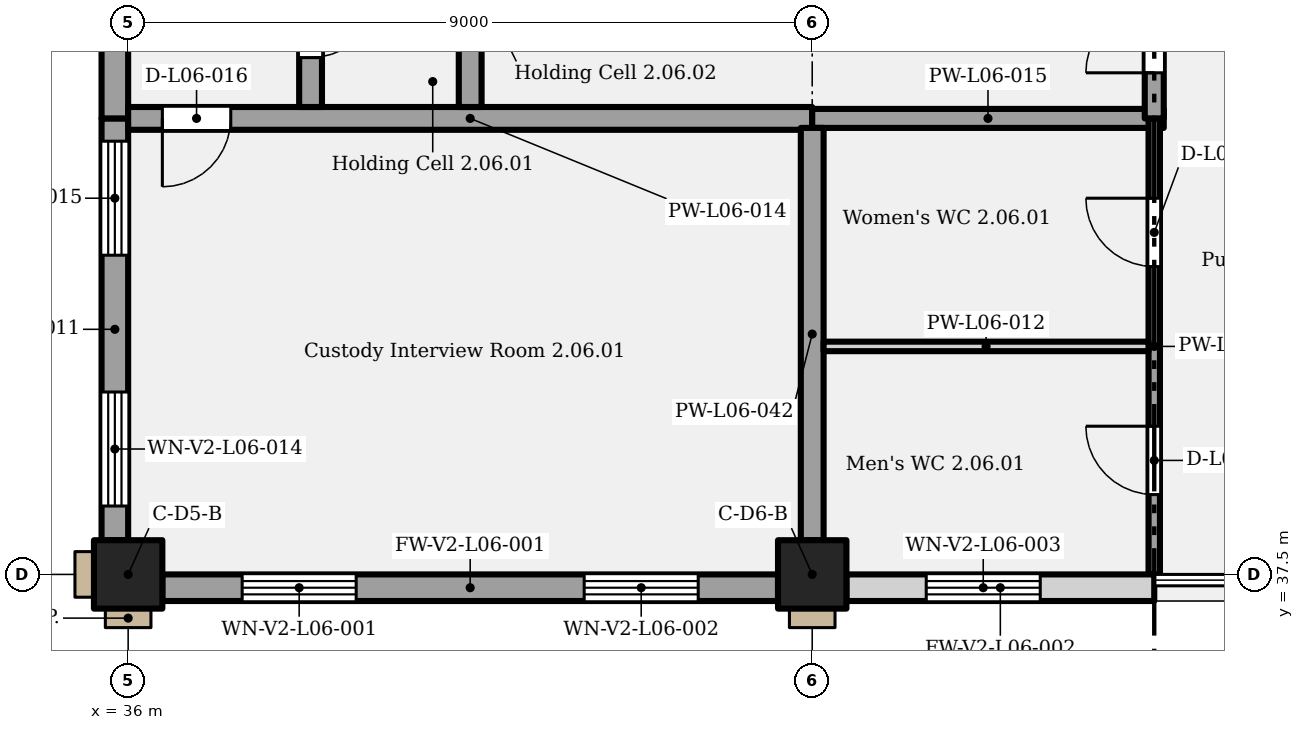
"""IFC4 building model, lengths in metres.
Left out: names, types, materials, properties, quantities, classifications, styles, units other than length and angle.
Written with IfcOpenShell. Run it as: python <this file> out.ifc"""

import sys

from ifc_helpers import new_model, si_unit, direction, frame, frame_2d, origin, origin_2d, place, context, subcontext, project, spatial, rectangle, extrude, element, fill, save


model = new_model("IFC4")
c1 = context("Model", 3, precision=1e-05, world=origin(), true_north=direction((0.0, 1.0)))
c2 = subcontext(c1, "Body", "Model", "MODEL_VIEW")
j1 = project(units=[si_unit("LENGTHUNIT", "METRE"), si_unit("PLANEANGLEUNIT", "RADIAN")], contexts=[c1])
p1 = place(None, origin())
s1 = spatial("IfcSite", under=j1, at=p1, CompositionType="ELEMENT")
p2 = place(p1, origin())
s2 = spatial("IfcBuilding", under=s1, at=p2, CompositionType="ELEMENT")
p3 = place(p2, frame((0.0, 0.0, 33.6)))
s3 = spatial("IfcBuildingStorey", under=s2, at=p3, CompositionType="ELEMENT", Elevation=33.6)
for number, where, z_axis, x_axis in (
    (1, (36.0, 37.5, 0.0), (0.0, 0.0, 1.0), (1.0, 0.0, 0.0)),
    (2, (45.0, 37.5, 0.0), (0.0, 0.0, 1.0), (1.0, 0.0, 0.0)),
):
    element("IfcColumn", number, at=place(p3, frame(where, z_axis=z_axis, x_axis=x_axis)), inside=s3, PredefinedType="COLUMN", context=c2, shape_type="SweptSolid", body=[
        extrude(rectangle(XDim=0.9, YDim=0.9, at=origin_2d()), origin(), (0.0, 0.0, 1.0), 5.4),
    ])
p4 = place(p3, frame((36.45, 37.325, 0.0), z_axis=(0.0, 0.0, 1.0), x_axis=(1.0, 0.0, 0.0)))
e3 = element("IfcWall", 3, at=p4, inside=s3, PredefinedType="SOLIDWALL", context=c2, shape_type="SweptSolid", body=[
    extrude(rectangle(XDim=8.1, YDim=0.35, at=frame_2d((4.05, 0.0))), origin(), (0.0, 0.0, 1.0), 5.15),
])
p5 = place(p4, frame((1.05, 0.0, 1.05)))
e4 = element("IfcOpeningElement", 4, at=p5, cuts=e3, PredefinedType="OPENING", context=c2, shape_type="SweptSolid", body=[
    extrude(rectangle(XDim=1.5, YDim=3.5, at=frame_2d((0.75, 1.75))), frame((0.0, 0.185, 0.0), z_axis=(0.0, -1.0, 0.0), x_axis=(1.0, 0.0, 0.0)), (0.0, 0.0, 1.0), 0.37),
])
p6 = place(p4, frame((5.55, 0.0, 1.05)))
e5 = element("IfcOpeningElement", 5, at=p6, cuts=e3, PredefinedType="OPENING", context=c2, shape_type="SweptSolid", body=[
    extrude(rectangle(XDim=1.5, YDim=3.5, at=frame_2d((0.75, 1.75))), frame((0.0, 0.185, 0.0), z_axis=(0.0, -1.0, 0.0), x_axis=(1.0, 0.0, 0.0)), (0.0, 0.0, 1.0), 0.37),
])
p7 = place(p3, frame((45.45, 37.325, 0.0), z_axis=(0.0, 0.0, 1.0), x_axis=(1.0, 0.0, 0.0)))
e6 = element("IfcWall", 6, at=p7, inside=s3, PredefinedType="SOLIDWALL", context=c2, shape_type="SweptSolid", body=[
    extrude(rectangle(XDim=4.05, YDim=0.35, at=frame_2d((2.025, 0.0))), origin(), (0.0, 0.0, 1.0), 5.15),
])
p8 = place(p7, frame((1.05, 0.0, 1.05)))
e7 = element("IfcOpeningElement", 7, at=p8, cuts=e6, PredefinedType="OPENING", context=c2, shape_type="SweptSolid", body=[
    extrude(rectangle(XDim=1.5, YDim=3.5, at=frame_2d((0.75, 1.75))), frame((0.0, 0.185, 0.0), z_axis=(0.0, -1.0, 0.0), x_axis=(1.0, 0.0, 0.0)), (0.0, 0.0, 1.0), 0.37),
])
p9 = place(p3, frame((35.825, 37.95, 0.0), z_axis=(0.0, 0.0, 1.0), x_axis=(0.0, 1.0, 0.0)))
e8 = element("IfcWall", 8, at=p9, inside=s3, PredefinedType="SOLIDWALL", context=c2, shape_type="SweptSolid", body=[
    extrude(rectangle(XDim=5.55, YDim=0.35, at=frame_2d((2.775, 0.0))), origin(), (0.0, 0.0, 1.0), 5.15),
])
p10 = place(p9, frame((0.45, 0.0, 1.05)))
e9 = element("IfcOpeningElement", 9, at=p10, cuts=e8, PredefinedType="OPENING", context=c2, shape_type="SweptSolid", body=[
    extrude(rectangle(XDim=1.5, YDim=3.5, at=frame_2d((0.75, 1.75))), frame((0.0, 0.185, 0.0), z_axis=(0.0, -1.0, 0.0), x_axis=(1.0, 0.0, 0.0)), (0.0, 0.0, 1.0), 0.37),
])
p11 = place(p9, frame((3.75, 0.0, 1.05)))
e10 = element("IfcOpeningElement", 10, at=p11, cuts=e8, PredefinedType="OPENING", context=c2, shape_type="SweptSolid", body=[
    extrude(rectangle(XDim=1.5, YDim=3.5, at=frame_2d((0.75, 1.75))), frame((0.0, 0.185, 0.0), z_axis=(0.0, -1.0, 0.0), x_axis=(1.0, 0.0, 0.0)), (0.0, 0.0, 1.0), 0.37),
])
p12 = place(p3, frame((35.825, 43.5, 0.0), z_axis=(0.0, 0.0, 1.0), x_axis=(0.0, 1.0, 0.0)))
e11 = element("IfcWall", 11, at=p12, inside=s3, PredefinedType="SOLIDWALL", context=c2, shape_type="SweptSolid", body=[
    extrude(rectangle(XDim=10.05, YDim=0.35, at=frame_2d((5.025, 0.0))), origin(), (0.0, 0.0, 1.0), 5.15),
])
p13 = place(p12, frame((1.5, 0.0, 1.05)))
e12 = element("IfcOpeningElement", 12, at=p13, cuts=e11, PredefinedType="OPENING", context=c2, shape_type="SweptSolid", body=[
    extrude(rectangle(XDim=1.5, YDim=3.5, at=frame_2d((0.75, 1.75))), frame((0.0, 0.185, 0.0), z_axis=(0.0, -1.0, 0.0), x_axis=(1.0, 0.0, 0.0)), (0.0, 0.0, 1.0), 0.37),
])
p14 = place(p12, frame((4.8, 0.0, 1.05)))
e13 = element("IfcOpeningElement", 13, at=p14, cuts=e11, PredefinedType="OPENING", context=c2, shape_type="SweptSolid", body=[
    extrude(rectangle(XDim=1.5, YDim=3.5, at=frame_2d((0.75, 1.75))), frame((0.0, 0.185, 0.0), z_axis=(0.0, -1.0, 0.0), x_axis=(1.0, 0.0, 0.0)), (0.0, 0.0, 1.0), 0.37),
])
p15 = place(p12, frame((8.1, 0.0, 1.05)))
e14 = element("IfcOpeningElement", 14, at=p15, cuts=e11, PredefinedType="OPENING", context=c2, shape_type="SweptSolid", body=[
    extrude(rectangle(XDim=1.5, YDim=3.5, at=frame_2d((0.75, 1.75))), frame((0.0, 0.185, 0.0), z_axis=(0.0, -1.0, 0.0), x_axis=(1.0, 0.0, 0.0)), (0.0, 0.0, 1.0), 0.37),
])
p16 = place(p3, frame((45.15, 40.5, 0.0), z_axis=(0.0, 0.0, 1.0), x_axis=(1.0, 0.0, 0.0)))
e15 = element("IfcWall", 15, at=p16, inside=s3, PredefinedType="PARTITIONING", context=c2, shape_type="SweptSolid", body=[
    extrude(rectangle(XDim=4.275, YDim=0.125, at=frame_2d((2.138, 0.0))), origin(), (0.0, 0.0, 1.0), 5.15),
])
p17 = place(p3, frame((36.0, 43.5, 0.0), z_axis=(0.0, 0.0, 1.0), x_axis=(1.0, 0.0, 0.0)))
e16 = element("IfcWall", 16, at=p17, inside=s3, PredefinedType="PARTITIONING", context=c2, shape_type="SweptSolid", body=[
    extrude(rectangle(XDim=9.0, YDim=0.3, at=frame_2d((4.5, 0.0))), origin(), (0.0, 0.0, 1.0), 5.15),
])
p18 = place(p17, frame((1.35, 0.0, 0.0), z_axis=(0.0, 0.0, 1.0), x_axis=(-1.0, 0.0, 0.0)))
e17 = element("IfcOpeningElement", 17, at=p18, cuts=e16, PredefinedType="OPENING", context=c2, shape_type="SweptSolid", body=[
    extrude(rectangle(XDim=0.9, YDim=2.1, at=frame_2d((0.45, 1.05))), frame((0.0, 0.16, 0.0), z_axis=(0.0, -1.0, 0.0), x_axis=(1.0, 0.0, 0.0)), (0.0, 0.0, 1.0), 0.32),
])
p19 = place(p3, frame((45.0, 43.5, 0.0), z_axis=(0.0, 0.0, 1.0), x_axis=(1.0, 0.0, 0.0)))
e18 = element("IfcWall", 18, at=p19, inside=s3, PredefinedType="PARTITIONING", context=c2, shape_type="SweptSolid", body=[
    extrude(rectangle(XDim=4.625, YDim=0.25, at=frame_2d((2.312, 0.0))), origin(), (0.0, 0.0, 1.0), 5.15),
])
p20 = place(p3, frame((38.4, 43.65, 0.0), z_axis=(0.0, 0.0, 1.0), x_axis=(0.0, 1.0, 0.0)))
e19 = element("IfcWall", 19, at=p20, inside=s3, PredefinedType="PARTITIONING", context=c2, shape_type="SweptSolid", body=[
    extrude(rectangle(XDim=10.35, YDim=0.3, at=frame_2d((5.175, 0.0))), origin(), (0.0, 0.0, 1.0), 5.15),
])
p21 = place(p20, frame((1.55, 0.0, 0.0), z_axis=(0.0, 0.0, 1.0), x_axis=(-1.0, 0.0, 0.0)))
e20 = element("IfcOpeningElement", 20, at=p21, cuts=e19, PredefinedType="OPENING", context=c2, shape_type="SweptSolid", body=[
    extrude(rectangle(XDim=0.9, YDim=2.0, at=frame_2d((0.45, 1.0))), frame((0.0, 0.16, 0.0), z_axis=(0.0, -1.0, 0.0), x_axis=(1.0, 0.0, 0.0)), (0.0, 0.0, 1.0), 0.32),
])
p22 = place(p20, frame((4.05, 0.0, 0.0), z_axis=(0.0, 0.0, 1.0), x_axis=(-1.0, 0.0, 0.0)))
e21 = element("IfcOpeningElement", 21, at=p22, cuts=e19, PredefinedType="OPENING", context=c2, shape_type="SweptSolid", body=[
    extrude(rectangle(XDim=0.9, YDim=2.0, at=frame_2d((0.45, 1.0))), frame((0.0, 0.16, 0.0), z_axis=(0.0, -1.0, 0.0), x_axis=(1.0, 0.0, 0.0)), (0.0, 0.0, 1.0), 0.32),
])
p23 = place(p20, frame((6.55, 0.0, 0.0), z_axis=(0.0, 0.0, 1.0), x_axis=(-1.0, 0.0, 0.0)))
e22 = element("IfcOpeningElement", 22, at=p23, cuts=e19, PredefinedType="OPENING", context=c2, shape_type="SweptSolid", body=[
    extrude(rectangle(XDim=0.9, YDim=2.0, at=frame_2d((0.45, 1.0))), frame((0.0, 0.16, 0.0), z_axis=(0.0, -1.0, 0.0), x_axis=(1.0, 0.0, 0.0)), (0.0, 0.0, 1.0), 0.32),
])
p24 = place(p20, frame((9.3, 0.0, 0.0), z_axis=(0.0, 0.0, 1.0), x_axis=(-1.0, 0.0, 0.0)))
e23 = element("IfcOpeningElement", 23, at=p24, cuts=e19, PredefinedType="OPENING", context=c2, shape_type="SweptSolid", body=[
    extrude(rectangle(XDim=0.9, YDim=2.0, at=frame_2d((0.45, 1.0))), frame((0.0, 0.16, 0.0), z_axis=(0.0, -1.0, 0.0), x_axis=(1.0, 0.0, 0.0)), (0.0, 0.0, 1.0), 0.32),
])
p25 = place(p3, frame((40.5, 43.65, 0.0), z_axis=(0.0, 0.0, 1.0), x_axis=(0.0, 1.0, 0.0)))
e24 = element("IfcWall", 24, at=p25, inside=s3, PredefinedType="PARTITIONING", context=c2, shape_type="SweptSolid", body=[
    extrude(rectangle(XDim=10.35, YDim=0.3, at=frame_2d((5.175, 0.0))), origin(), (0.0, 0.0, 1.0), 5.15),
])
p26 = place(p25, frame((9.35, 0.0, 0.0), z_axis=(0.0, 0.0, 1.0), x_axis=(-1.0, 0.0, 0.0)))
e25 = element("IfcOpeningElement", 25, at=p26, cuts=e24, PredefinedType="OPENING", context=c2, shape_type="SweptSolid", body=[
    extrude(rectangle(XDim=1.0, YDim=2.0, at=frame_2d((0.5, 1.0))), frame((0.0, 0.16, 0.0), z_axis=(0.0, -1.0, 0.0), x_axis=(1.0, 0.0, 0.0)), (0.0, 0.0, 1.0), 0.32),
])
p27 = place(p3, frame((45.0, 37.95, 0.0), z_axis=(0.0, 0.0, 1.0), x_axis=(0.0, 1.0, 0.0)))
e26 = element("IfcWall", 26, at=p27, inside=s3, PredefinedType="PARTITIONING", context=c2, shape_type="SweptSolid", body=[
    extrude(rectangle(XDim=5.425, YDim=0.3, at=frame_2d((2.712, 0.0))), origin(), (0.0, 0.0, 1.0), 4.2),
])
p28 = place(p3, frame((49.5, 37.5, 0.0), z_axis=(0.0, 0.0, 1.0), x_axis=(0.0, 1.0, 0.0)))
e27 = element("IfcWall", 27, at=p28, inside=s3, PredefinedType="PARTITIONING", context=c2, shape_type="SweptSolid", body=[
    extrude(rectangle(XDim=6.0, YDim=0.15, at=frame_2d((3.0, 0.0))), origin(), (0.0, 0.0, 1.0), 5.15),
])
p29 = place(p28, frame((1.05, 0.0, 0.0)))
e28 = element("IfcOpeningElement", 28, at=p29, cuts=e27, PredefinedType="OPENING", context=c2, shape_type="SweptSolid", body=[
    extrude(rectangle(XDim=0.9, YDim=2.1, at=frame_2d((0.45, 1.05))), frame((0.0, 0.085, 0.0), z_axis=(0.0, -1.0, 0.0), x_axis=(1.0, 0.0, 0.0)), (0.0, 0.0, 1.0), 0.17),
])
p30 = place(p28, frame((4.05, 0.0, 0.0)))
e29 = element("IfcOpeningElement", 29, at=p30, cuts=e27, PredefinedType="OPENING", context=c2, shape_type="SweptSolid", body=[
    extrude(rectangle(XDim=0.9, YDim=2.1, at=frame_2d((0.45, 1.05))), frame((0.0, 0.085, 0.0), z_axis=(0.0, -1.0, 0.0), x_axis=(1.0, 0.0, 0.0)), (0.0, 0.0, 1.0), 0.17),
])
p31 = place(p3, frame((49.5, 43.5, 0.0), z_axis=(0.0, 0.0, 1.0), x_axis=(0.0, 1.0, 0.0)))
e30 = element("IfcWall", 30, at=p31, inside=s3, PredefinedType="PARTITIONING", context=c2, shape_type="SweptSolid", body=[
    extrude(rectangle(XDim=10.5, YDim=0.25, at=frame_2d((5.25, 0.0))), origin(), (0.0, 0.0, 1.0), 5.15),
])
p32 = place(p31, frame((0.6, 0.0, 0.0)))
e31 = element("IfcOpeningElement", 31, at=p32, cuts=e30, PredefinedType="OPENING", context=c2, shape_type="SweptSolid", body=[
    extrude(rectangle(XDim=1.8, YDim=2.4, at=frame_2d((0.9, 1.2))), frame((0.0, 0.135, 0.0), z_axis=(0.0, -1.0, 0.0), x_axis=(1.0, 0.0, 0.0)), (0.0, 0.0, 1.0), 0.27),
])
p33 = place(p31, frame((7.1, 0.0, 0.0)))
e32 = element("IfcOpeningElement", 32, at=p33, cuts=e30, PredefinedType="OPENING", context=c2, shape_type="SweptSolid", body=[
    extrude(rectangle(XDim=1.8, YDim=2.4, at=frame_2d((0.9, 1.2))), frame((0.0, 0.135, 0.0), z_axis=(0.0, -1.0, 0.0), x_axis=(1.0, 0.0, 0.0)), (0.0, 0.0, 1.0), 0.27),
])
p34 = place(p5, origin())
e33 = element("IfcWindow", 33, at=p34, inside=s3, PartitioningType="SINGLE_PANEL", PredefinedType="WINDOW", context=c2, shape_type="SweptSolid", body=[
    extrude(rectangle(XDim=1.5, YDim=3.5, at=frame_2d((0.75, 1.75))), frame((0.0, 0.03, 0.0), z_axis=(0.0, -1.0, 0.0), x_axis=(1.0, 0.0, 0.0)), (0.0, 0.0, 1.0), 0.06),
])
fill(e4, e33)
p35 = place(p6, origin())
e34 = element("IfcWindow", 34, at=p35, inside=s3, PartitioningType="SINGLE_PANEL", PredefinedType="WINDOW", context=c2, shape_type="SweptSolid", body=[
    extrude(rectangle(XDim=1.5, YDim=3.5, at=frame_2d((0.75, 1.75))), frame((0.0, 0.03, 0.0), z_axis=(0.0, -1.0, 0.0), x_axis=(1.0, 0.0, 0.0)), (0.0, 0.0, 1.0), 0.06),
])
fill(e5, e34)
p36 = place(p8, origin())
e35 = element("IfcWindow", 35, at=p36, inside=s3, PartitioningType="SINGLE_PANEL", PredefinedType="WINDOW", context=c2, shape_type="SweptSolid", body=[
    extrude(rectangle(XDim=1.5, YDim=3.5, at=frame_2d((0.75, 1.75))), frame((0.0, 0.03, 0.0), z_axis=(0.0, -1.0, 0.0), x_axis=(1.0, 0.0, 0.0)), (0.0, 0.0, 1.0), 0.06),
])
fill(e7, e35)
p37 = place(p10, origin())
e36 = element("IfcWindow", 36, at=p37, inside=s3, PartitioningType="SINGLE_PANEL", PredefinedType="WINDOW", context=c2, shape_type="SweptSolid", body=[
    extrude(rectangle(XDim=1.5, YDim=3.5, at=frame_2d((0.75, 1.75))), frame((0.0, 0.03, 0.0), z_axis=(0.0, -1.0, 0.0), x_axis=(1.0, 0.0, 0.0)), (0.0, 0.0, 1.0), 0.06),
])
fill(e9, e36)
p38 = place(p11, origin())
e37 = element("IfcWindow", 37, at=p38, inside=s3, PartitioningType="SINGLE_PANEL", PredefinedType="WINDOW", context=c2, shape_type="SweptSolid", body=[
    extrude(rectangle(XDim=1.5, YDim=3.5, at=frame_2d((0.75, 1.75))), frame((0.0, 0.03, 0.0), z_axis=(0.0, -1.0, 0.0), x_axis=(1.0, 0.0, 0.0)), (0.0, 0.0, 1.0), 0.06),
])
fill(e10, e37)
p39 = place(p32, origin())
e38 = element("IfcDoor", 38, at=p39, inside=s3, OperationType="DOUBLE_DOOR_SINGLE_SWING", PredefinedType="DOOR", context=c2, shape_type="SweptSolid", body=[
    extrude(rectangle(XDim=1.8, YDim=2.4, at=frame_2d((0.9, 1.2))), frame((0.0, 0.025, 0.0), z_axis=(0.0, -1.0, 0.0), x_axis=(1.0, 0.0, 0.0)), (0.0, 0.0, 1.0), 0.05),
])
fill(e31, e38)
p40 = place(p18, origin())
e39 = element("IfcDoor", 39, at=p40, inside=s3, OperationType="SINGLE_SWING_RIGHT", PredefinedType="DOOR", context=c2, shape_type="SweptSolid", body=[
    extrude(rectangle(XDim=0.9, YDim=2.1, at=frame_2d((0.45, 1.05))), frame((0.0, 0.025, 0.0), z_axis=(0.0, -1.0, 0.0), x_axis=(1.0, 0.0, 0.0)), (0.0, 0.0, 1.0), 0.05),
])
fill(e17, e39)
p41 = place(p21, origin())
e40 = element("IfcDoor", 40, at=p41, inside=s3, OperationType="SINGLE_SWING_LEFT", PredefinedType="DOOR", context=c2, shape_type="SweptSolid", body=[
    extrude(rectangle(XDim=0.9, YDim=2.0, at=frame_2d((0.45, 1.0))), frame((0.0, 0.025, 0.0), z_axis=(0.0, -1.0, 0.0), x_axis=(1.0, 0.0, 0.0)), (0.0, 0.0, 1.0), 0.05),
])
fill(e20, e40)
p42 = place(p29, origin())
e41 = element("IfcDoor", 41, at=p42, inside=s3, OperationType="SINGLE_SWING_RIGHT", PredefinedType="DOOR", context=c2, shape_type="SweptSolid", body=[
    extrude(rectangle(XDim=0.9, YDim=2.1, at=frame_2d((0.45, 1.05))), frame((0.0, 0.025, 0.0), z_axis=(0.0, -1.0, 0.0), x_axis=(1.0, 0.0, 0.0)), (0.0, 0.0, 1.0), 0.05),
])
fill(e28, e41)
p43 = place(p30, origin())
e42 = element("IfcDoor", 42, at=p43, inside=s3, OperationType="SINGLE_SWING_RIGHT", PredefinedType="DOOR", context=c2, shape_type="SweptSolid", body=[
    extrude(rectangle(XDim=0.9, YDim=2.1, at=frame_2d((0.45, 1.05))), frame((0.0, 0.025, 0.0), z_axis=(0.0, -1.0, 0.0), x_axis=(1.0, 0.0, 0.0)), (0.0, 0.0, 1.0), 0.05),
])
fill(e29, e42)
save(model, sys.argv[1])
